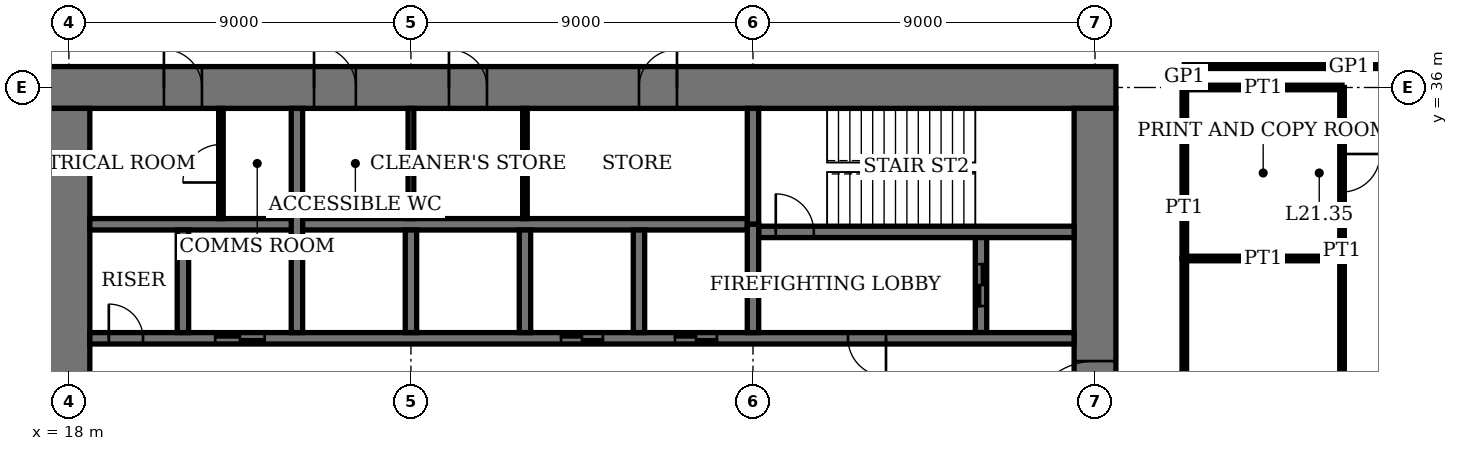
"""IFC4 building model, lengths in metres.
Left out: names, types, materials, properties, quantities, classifications, styles, units other than length and angle.
Written with IfcOpenShell. Run it as: python <this file> out.ifc"""

import sys

from ifc_helpers import new_model, si_unit, direction, frame, frame_2d, origin, place, context, subcontext, project, spatial, rectangle, extrude, element, fill, save


model = new_model("IFC4")
c1 = context("Model", 3, precision=1e-05, world=origin(), true_north=direction((0.0, 1.0)))
c2 = subcontext(c1, "Body", "Model", "MODEL_VIEW")
j1 = project(units=[si_unit("LENGTHUNIT", "METRE"), si_unit("PLANEANGLEUNIT", "RADIAN")], contexts=[c1])
p1 = place(None, origin())
s1 = spatial("IfcSite", under=j1, at=p1, CompositionType="ELEMENT")
p2 = place(p1, origin())
s2 = spatial("IfcBuilding", under=s1, at=p2, CompositionType="ELEMENT")
p3 = place(p2, frame((0.0, 0.0, 89.0)))
s3 = spatial("IfcBuildingStorey", under=s2, at=p3, CompositionType="ELEMENT", Elevation=89.0)
p4 = place(p3, frame((45.55, 36.0, 0.0), z_axis=(0.0, 0.0, 1.0), x_axis=(-1.0, 0.0, 0.0)))
e1 = element("IfcWall", 1, at=p4, inside=s3, PredefinedType="SHEAR", context=c2, shape_type="SweptSolid", body=[
    extrude(rectangle(XDim=28.1, YDim=1.1, at=frame_2d((14.05, 0.0))), origin(), (0.0, 0.0, 1.0), 4.0),
])
p5 = place(p4, frame((11.55, 0.0, 0.0)))
e2 = element("IfcOpeningElement", 2, at=p5, cuts=e1, PredefinedType="OPENING", context=c2, shape_type="SweptSolid", body=[
    extrude(rectangle(XDim=1.0, YDim=2.4, at=frame_2d((0.5, 1.2))), frame((0.0, 0.56, 0.0), z_axis=(0.0, -1.0, 0.0), x_axis=(1.0, 0.0, 0.0)), (0.0, 0.0, 1.0), 1.12),
])
p6 = place(p4, frame((16.55, 0.0, 0.0)))
e3 = element("IfcOpeningElement", 3, at=p6, cuts=e1, PredefinedType="OPENING", context=c2, shape_type="SweptSolid", body=[
    extrude(rectangle(XDim=1.0, YDim=2.4, at=frame_2d((0.5, 1.2))), frame((0.0, 0.56, 0.0), z_axis=(0.0, -1.0, 0.0), x_axis=(1.0, 0.0, 0.0)), (0.0, 0.0, 1.0), 1.12),
])
p7 = place(p4, frame((20.0, 0.0, 0.0)))
e4 = element("IfcOpeningElement", 4, at=p7, cuts=e1, PredefinedType="OPENING", context=c2, shape_type="SweptSolid", body=[
    extrude(rectangle(XDim=1.1, YDim=2.4, at=frame_2d((0.55, 1.2))), frame((0.0, 0.56, 0.0), z_axis=(0.0, -1.0, 0.0), x_axis=(1.0, 0.0, 0.0)), (0.0, 0.0, 1.0), 1.12),
])
p8 = place(p4, frame((24.05, 0.0, 0.0)))
e5 = element("IfcOpeningElement", 5, at=p8, cuts=e1, PredefinedType="OPENING", context=c2, shape_type="SweptSolid", body=[
    extrude(rectangle(XDim=1.0, YDim=2.4, at=frame_2d((0.5, 1.2))), frame((0.0, 0.56, 0.0), z_axis=(0.0, -1.0, 0.0), x_axis=(1.0, 0.0, 0.0)), (0.0, 0.0, 1.0), 1.12),
])
p9 = place(p3, frame((18.0, 35.45, 0.0), z_axis=(0.0, 0.0, 1.0), x_axis=(0.0, -1.0, 0.0)))
e6 = element("IfcWall", 6, at=p9, inside=s3, PredefinedType="SHEAR", context=c2, shape_type="SweptSolid", body=[
    extrude(rectangle(XDim=16.9, YDim=1.1, at=frame_2d((8.45, 0.0))), origin(), (0.0, 0.0, 1.0), 4.0),
])
p10 = place(p9, frame((8.45, 0.0, 0.0)))
e7 = element("IfcOpeningElement", 7, at=p10, cuts=e6, PredefinedType="OPENING", context=c2, shape_type="SweptSolid", body=[
    extrude(rectangle(XDim=1.8, YDim=2.4, at=frame_2d((0.9, 1.2))), frame((0.0, 0.56, 0.0), z_axis=(0.0, -1.0, 0.0), x_axis=(1.0, 0.0, 0.0)), (0.0, 0.0, 1.0), 1.12),
])
p11 = place(p3, frame((45.0, 18.55, 0.0), z_axis=(0.0, 0.0, 1.0), x_axis=(0.0, 1.0, 0.0)))
e8 = element("IfcWall", 8, at=p11, inside=s3, PredefinedType="SHEAR", context=c2, shape_type="SweptSolid", body=[
    extrude(rectangle(XDim=16.9, YDim=1.1, at=frame_2d((8.45, 0.0))), origin(), (0.0, 0.0, 1.0), 4.0),
])
p12 = place(p11, frame((8.45, 0.0, 0.0)))
e9 = element("IfcOpeningElement", 9, at=p12, cuts=e8, PredefinedType="OPENING", context=c2, shape_type="SweptSolid", body=[
    extrude(rectangle(XDim=1.8, YDim=2.4, at=frame_2d((0.9, 1.2))), frame((0.0, 0.56, 0.0), z_axis=(0.0, -1.0, 0.0), x_axis=(1.0, 0.0, 0.0)), (0.0, 0.0, 1.0), 1.12),
])
p13 = place(p3, frame((36.15, 32.2, 0.0), z_axis=(0.0, 0.0, 1.0), x_axis=(1.0, 0.0, 0.0)))
e10 = element("IfcWall", 10, at=p13, inside=s3, PredefinedType="SHEAR", context=c2, shape_type="SweptSolid", body=[
    extrude(rectangle(XDim=8.3, YDim=0.3, at=frame_2d((4.15, 0.0))), origin(), (0.0, 0.0, 1.0), 4.0),
])
p14 = place(p13, frame((0.45, 0.0, 0.0)))
e11 = element("IfcOpeningElement", 11, at=p14, cuts=e10, PredefinedType="OPENING", context=c2, shape_type="SweptSolid", body=[
    extrude(rectangle(XDim=1.0, YDim=2.4, at=frame_2d((0.5, 1.2))), frame((0.0, 0.16, 0.0), z_axis=(0.0, -1.0, 0.0), x_axis=(1.0, 0.0, 0.0)), (0.0, 0.0, 1.0), 0.32),
])
p15 = place(p3, frame((36.0, 32.4, 0.0), z_axis=(0.0, 0.0, 1.0), x_axis=(0.0, 1.0, 0.0)))
e12 = element("IfcWall", 12, at=p15, inside=s3, PredefinedType="SHEAR", context=c2, shape_type="SweptSolid", body=[
    extrude(rectangle(XDim=3.05, YDim=0.3, at=frame_2d((1.525, 0.0))), origin(), (0.0, 0.0, 1.0), 4.0),
])
p16 = place(p3, frame((42.0, 29.55, 0.0), z_axis=(0.0, 0.0, 1.0), x_axis=(0.0, 1.0, 0.0)))
e13 = element("IfcWall", 13, at=p16, inside=s3, PredefinedType="SHEAR", context=c2, shape_type="SweptSolid", body=[
    extrude(rectangle(XDim=2.5, YDim=0.3, at=frame_2d((1.25, 0.0))), origin(), (0.0, 0.0, 1.0), 4.0),
])
p17 = place(p16, frame((0.7, 0.0, 0.0)))
e14 = element("IfcOpeningElement", 14, at=p17, cuts=e13, PredefinedType="OPENING", context=c2, shape_type="SweptSolid", body=[
    extrude(rectangle(XDim=1.1, YDim=2.4, at=frame_2d((0.55, 1.2))), frame((0.0, 0.16, 0.0), z_axis=(0.0, -1.0, 0.0), x_axis=(1.0, 0.0, 0.0)), (0.0, 0.0, 1.0), 0.32),
])
p18 = place(p3, frame((18.55, 29.4, 0.0), z_axis=(0.0, 0.0, 1.0), x_axis=(1.0, 0.0, 0.0)))
e15 = element("IfcWall", 15, at=p18, inside=s3, PredefinedType="SHEAR", context=c2, shape_type="SweptSolid", body=[
    extrude(rectangle(XDim=25.9, YDim=0.3, at=frame_2d((12.95, 0.0))), origin(), (0.0, 0.0, 1.0), 4.0),
])
p19 = place(p18, frame((19.95, 0.0, 0.0)))
e16 = element("IfcOpeningElement", 16, at=p19, cuts=e15, PredefinedType="OPENING", context=c2, shape_type="SweptSolid", body=[
    extrude(rectangle(XDim=1.0, YDim=2.4, at=frame_2d((0.5, 1.2))), frame((0.0, 0.16, 0.0), z_axis=(0.0, -1.0, 0.0), x_axis=(1.0, 0.0, 0.0)), (0.0, 0.0, 1.0), 0.32),
])
p20 = place(p18, frame((0.5, 0.0, 0.0)))
e17 = element("IfcOpeningElement", 17, at=p20, cuts=e15, PredefinedType="OPENING", context=c2, shape_type="SweptSolid", body=[
    extrude(rectangle(XDim=0.9, YDim=2.1, at=frame_2d((0.45, 1.05))), frame((0.0, 0.16, 0.0), z_axis=(0.0, -1.0, 0.0), x_axis=(1.0, 0.0, 0.0)), (0.0, 0.0, 1.0), 0.32),
])
p21 = place(p18, frame((15.4, 0.0, 0.0)))
e18 = element("IfcOpeningElement", 18, at=p21, cuts=e15, PredefinedType="OPENING", context=c2, shape_type="SweptSolid", body=[
    extrude(rectangle(XDim=1.1, YDim=2.4, at=frame_2d((0.55, 1.2))), frame((0.0, 0.16, 0.0), z_axis=(0.0, -1.0, 0.0), x_axis=(1.0, 0.0, 0.0)), (0.0, 0.0, 1.0), 0.32),
])
p22 = place(p18, frame((12.4, 0.0, 0.0)))
e19 = element("IfcOpeningElement", 19, at=p22, cuts=e15, PredefinedType="OPENING", context=c2, shape_type="SweptSolid", body=[
    extrude(rectangle(XDim=1.1, YDim=2.4, at=frame_2d((0.55, 1.2))), frame((0.0, 0.16, 0.0), z_axis=(0.0, -1.0, 0.0), x_axis=(1.0, 0.0, 0.0)), (0.0, 0.0, 1.0), 0.32),
])
p23 = place(p18, frame((3.3, 0.0, 0.0)))
e20 = element("IfcOpeningElement", 20, at=p23, cuts=e15, PredefinedType="OPENING", context=c2, shape_type="SweptSolid", body=[
    extrude(rectangle(XDim=1.3, YDim=2.4, at=frame_2d((0.65, 1.2))), frame((0.0, 0.16, 0.0), z_axis=(0.0, -1.0, 0.0), x_axis=(1.0, 0.0, 0.0)), (0.0, 0.0, 1.0), 0.32),
])
p24 = place(p3, frame((18.55, 32.4, 0.0), z_axis=(0.0, 0.0, 1.0), x_axis=(1.0, 0.0, 0.0)))
e21 = element("IfcWall", 21, at=p24, inside=s3, PredefinedType="SHEAR", context=c2, shape_type="SweptSolid", body=[
    extrude(rectangle(XDim=17.3, YDim=0.3, at=frame_2d((8.65, 0.0))), origin(), (0.0, 0.0, 1.0), 4.0),
])
for number, where, z_axis, x_axis in (
    (22, (33.0, 29.55, 0.0), (0.0, 0.0, 1.0), (0.0, 1.0, 0.0)),
    (23, (30.0, 29.55, 0.0), (0.0, 0.0, 1.0), (0.0, 1.0, 0.0)),
    (24, (27.0, 29.55, 0.0), (0.0, 0.0, 1.0), (0.0, 1.0, 0.0)),
):
    element("IfcWall", number, at=place(p3, frame(where, z_axis=z_axis, x_axis=x_axis)), inside=s3, PredefinedType="SHEAR", context=c2, shape_type="SweptSolid", body=[
        extrude(rectangle(XDim=2.7, YDim=0.3, at=frame_2d((1.35, 0.0))), origin(), (0.0, 0.0, 1.0), 4.0),
    ])
p25 = place(p3, frame((24.0, 29.55, 0.0), z_axis=(0.0, 0.0, 1.0), x_axis=(0.0, 1.0, 0.0)))
e25 = element("IfcWall", 25, at=p25, inside=s3, PredefinedType="SHEAR", context=c2, shape_type="SweptSolid", body=[
    extrude(rectangle(XDim=5.9, YDim=0.3, at=frame_2d((2.95, 0.0))), origin(), (0.0, 0.0, 1.0), 4.0),
])
p26 = place(p3, frame((21.0, 29.55, 0.0), z_axis=(0.0, 0.0, 1.0), x_axis=(0.0, 1.0, 0.0)))
e26 = element("IfcWall", 26, at=p26, inside=s3, PredefinedType="SHEAR", context=c2, shape_type="SweptSolid", body=[
    extrude(rectangle(XDim=2.7, YDim=0.3, at=frame_2d((1.35, 0.0))), origin(), (0.0, 0.0, 1.0), 4.0),
])
p27 = place(p3, frame((36.0, 29.55, 0.0), z_axis=(0.0, 0.0, 1.0), x_axis=(0.0, 1.0, 0.0)))
e27 = element("IfcWall", 27, at=p27, inside=s3, PredefinedType="SHEAR", context=c2, shape_type="SweptSolid", body=[
    extrude(rectangle(XDim=2.85, YDim=0.3, at=frame_2d((1.425, 0.0))), origin(), (0.0, 0.0, 1.0), 4.0),
])
p28 = place(p3, frame((47.35, 31.5, 0.0), z_axis=(0.0, 0.0, 1.0), x_axis=(1.0, 0.0, 0.0)))
e28 = element("IfcWall", 28, at=p28, inside=s3, PredefinedType="PARTITIONING", context=c2, shape_type="SweptSolid", body=[
    extrude(rectangle(XDim=4.15, YDim=0.12, at=frame_2d((2.075, 0.0))), origin(), (0.0, 0.0, 1.0), 3.1),
])
p29 = place(p3, frame((47.35, 36.0, 0.0), z_axis=(0.0, 0.0, 1.0), x_axis=(1.0, 0.0, 0.0)))
e29 = element("IfcWall", 29, at=p29, inside=s3, PredefinedType="PARTITIONING", context=c2, shape_type="SweptSolid", body=[
    extrude(rectangle(XDim=4.15, YDim=0.12, at=frame_2d((2.075, 0.0))), origin(), (0.0, 0.0, 1.0), 3.05),
])
p30 = place(p3, frame((47.35, 36.55, 0.0), z_axis=(0.0, 0.0, 1.0), x_axis=(1.0, 0.0, 0.0)))
e30 = element("IfcWall", 30, at=p30, inside=s3, PredefinedType="PARTITIONING", context=c2, shape_type="SweptSolid", body=[
    extrude(rectangle(XDim=5.575, YDim=0.1, at=frame_2d((2.788, 0.0))), origin(), (0.0, 0.0, 1.0), 3.75),
])
p31 = place(p3, frame((47.35, 31.5, 0.0), z_axis=(0.0, 0.0, 1.0), x_axis=(0.0, 1.0, 0.0)))
e31 = element("IfcWall", 31, at=p31, inside=s3, PredefinedType="PARTITIONING", context=c2, shape_type="SweptSolid", body=[
    extrude(rectangle(XDim=4.5, YDim=0.12, at=frame_2d((2.25, 0.0))), origin(), (0.0, 0.0, 1.0), 3.75),
])
p32 = place(p3, frame((47.35, 22.5, 0.0), z_axis=(0.0, 0.0, 1.0), x_axis=(0.0, 1.0, 0.0)))
e32 = element("IfcWall", 32, at=p32, inside=s3, PredefinedType="PARTITIONING", context=c2, shape_type="SweptSolid", body=[
    extrude(rectangle(XDim=9.0, YDim=0.12, at=frame_2d((4.5, 0.0))), origin(), (0.0, 0.0, 1.0), 3.75),
])
p33 = place(p3, frame((47.35, 36.0, 0.0), z_axis=(0.0, 0.0, 1.0), x_axis=(0.0, 1.0, 0.0)))
e33 = element("IfcWall", 33, at=p33, inside=s3, PredefinedType="PARTITIONING", context=c2, shape_type="SweptSolid", body=[
    extrude(rectangle(XDim=0.55, YDim=0.1, at=frame_2d((0.275, 0.0))), origin(), (0.0, 0.0, 1.0), 3.75),
])
p34 = place(p3, frame((51.5, 31.5, 0.0), z_axis=(0.0, 0.0, 1.0), x_axis=(0.0, 1.0, 0.0)))
e34 = element("IfcWall", 34, at=p34, inside=s3, PredefinedType="PARTITIONING", context=c2, shape_type="SweptSolid", body=[
    extrude(rectangle(XDim=4.5, YDim=0.12, at=frame_2d((2.25, 0.0))), origin(), (0.0, 0.0, 1.0), 3.75),
])
p35 = place(p34, frame((1.75, 0.0, 0.0)))
e35 = element("IfcOpeningElement", 35, at=p35, cuts=e34, PredefinedType="OPENING", context=c2, shape_type="SweptSolid", body=[
    extrude(rectangle(XDim=1.0, YDim=2.4, at=frame_2d((0.5, 1.2))), frame((0.0, 0.07, 0.0), z_axis=(0.0, -1.0, 0.0), x_axis=(1.0, 0.0, 0.0)), (0.0, 0.0, 1.0), 0.14),
])
p36 = place(p3, frame((51.5, 22.5, 0.0), z_axis=(0.0, 0.0, 1.0), x_axis=(0.0, 1.0, 0.0)))
e36 = element("IfcWall", 36, at=p36, inside=s3, PredefinedType="PARTITIONING", context=c2, shape_type="SweptSolid", body=[
    extrude(rectangle(XDim=9.0, YDim=0.12, at=frame_2d((4.5, 0.0))), origin(), (0.0, 0.0, 1.0), 3.75),
])
p37 = place(p36, frame((4.0, 0.0, 0.0)))
e37 = element("IfcOpeningElement", 37, at=p37, cuts=e36, PredefinedType="OPENING", context=c2, shape_type="SweptSolid", body=[
    extrude(rectangle(XDim=1.0, YDim=2.4, at=frame_2d((0.5, 1.2))), frame((0.0, 0.07, 0.0), z_axis=(0.0, -1.0, 0.0), x_axis=(1.0, 0.0, 0.0)), (0.0, 0.0, 1.0), 0.14),
])
p38 = place(p3, frame((30.0, 32.55, 0.0), z_axis=(0.0, 0.0, 1.0), x_axis=(0.0, 1.0, 0.0)))
e38 = element("IfcWall", 38, at=p38, inside=s3, PredefinedType="PARTITIONING", context=c2, shape_type="SweptSolid", body=[
    extrude(rectangle(XDim=2.9, YDim=0.12, at=frame_2d((1.45, 0.0))), origin(), (0.0, 0.0, 1.0), 3.75),
])
p39 = place(p3, frame((27.0, 32.55, 0.0), z_axis=(0.0, 0.0, 1.0), x_axis=(0.0, 1.0, 0.0)))
e39 = element("IfcWall", 39, at=p39, inside=s3, PredefinedType="PARTITIONING", context=c2, shape_type="SweptSolid", body=[
    extrude(rectangle(XDim=2.9, YDim=0.15, at=frame_2d((1.45, 0.0))), origin(), (0.0, 0.0, 1.0), 3.75),
])
p40 = place(p3, frame((22.0, 32.55, 0.0), z_axis=(0.0, 0.0, 1.0), x_axis=(0.0, 1.0, 0.0)))
e40 = element("IfcWall", 40, at=p40, inside=s3, PredefinedType="PARTITIONING", context=c2, shape_type="SweptSolid", body=[
    extrude(rectangle(XDim=2.9, YDim=0.12, at=frame_2d((1.45, 0.0))), origin(), (0.0, 0.0, 1.0), 3.75),
])
p41 = place(p40, frame((0.95, 0.0, 0.0)))
e41 = element("IfcOpeningElement", 41, at=p41, cuts=e40, PredefinedType="OPENING", context=c2, shape_type="SweptSolid", body=[
    extrude(rectangle(XDim=1.0, YDim=2.4, at=frame_2d((0.5, 1.2))), frame((0.0, 0.07, 0.0), z_axis=(0.0, -1.0, 0.0), x_axis=(1.0, 0.0, 0.0)), (0.0, 0.0, 1.0), 0.14),
])
p42 = place(p12, origin())
e42 = element("IfcDoor", 42, at=p42, inside=s3, OperationType="DOUBLE_DOOR_DOUBLE_SWING", PredefinedType="DOOR", context=c2, shape_type="SweptSolid", body=[
    extrude(rectangle(XDim=1.8, YDim=2.4, at=frame_2d((0.9, 1.2))), frame((0.0, 0.03, 0.0), z_axis=(0.0, -1.0, 0.0), x_axis=(1.0, 0.0, 0.0)), (0.0, 0.0, 1.0), 0.06),
    extrude(rectangle(XDim=0.04, YDim=2.4, at=frame_2d((0.02, 1.2))), frame((0.0, 0.55, 0.0), z_axis=(0.0, -1.0, 0.0), x_axis=(1.0, 0.0, 0.0)), (0.0, 0.0, 1.0), 1.1),
    extrude(rectangle(XDim=0.04, YDim=2.4, at=frame_2d((1.78, 1.2))), frame((0.0, 0.55, 0.0), z_axis=(0.0, -1.0, 0.0), x_axis=(1.0, 0.0, 0.0)), (0.0, 0.0, 1.0), 1.1),
    extrude(rectangle(XDim=1.8, YDim=0.04, at=frame_2d((0.9, 2.38))), frame((0.0, 0.55, 0.0), z_axis=(0.0, -1.0, 0.0), x_axis=(1.0, 0.0, 0.0)), (0.0, 0.0, 1.0), 1.1),
])
fill(e9, e42)
p43 = place(p5, origin())
e43 = element("IfcDoor", 43, at=p43, inside=s3, OperationType="SINGLE_SWING_LEFT", PredefinedType="DOOR", context=c2, shape_type="SweptSolid", body=[
    extrude(rectangle(XDim=1.0, YDim=2.4, at=frame_2d((0.5, 1.2))), frame((0.0, 0.025, 0.0), z_axis=(0.0, -1.0, 0.0), x_axis=(1.0, 0.0, 0.0)), (0.0, 0.0, 1.0), 0.05),
    extrude(rectangle(XDim=0.04, YDim=2.4, at=frame_2d((0.02, 1.2))), frame((0.0, 0.4, 0.0), z_axis=(0.0, -1.0, 0.0), x_axis=(1.0, 0.0, 0.0)), (0.0, 0.0, 1.0), 0.8),
    extrude(rectangle(XDim=0.04, YDim=2.4, at=frame_2d((0.98, 1.2))), frame((0.0, 0.4, 0.0), z_axis=(0.0, -1.0, 0.0), x_axis=(1.0, 0.0, 0.0)), (0.0, 0.0, 1.0), 0.8),
    extrude(rectangle(XDim=1.0, YDim=0.04, at=frame_2d((0.5, 2.38))), frame((0.0, 0.4, 0.0), z_axis=(0.0, -1.0, 0.0), x_axis=(1.0, 0.0, 0.0)), (0.0, 0.0, 1.0), 0.8),
])
fill(e2, e43)
p44 = place(p6, origin())
e44 = element("IfcDoor", 44, at=p44, inside=s3, OperationType="SINGLE_SWING_RIGHT", PredefinedType="DOOR", context=c2, shape_type="SweptSolid", body=[
    extrude(rectangle(XDim=1.0, YDim=2.4, at=frame_2d((0.5, 1.2))), frame((0.0, 0.025, 0.0), z_axis=(0.0, -1.0, 0.0), x_axis=(1.0, 0.0, 0.0)), (0.0, 0.0, 1.0), 0.05),
    extrude(rectangle(XDim=0.04, YDim=2.4, at=frame_2d((0.02, 1.2))), frame((0.0, 0.4, 0.0), z_axis=(0.0, -1.0, 0.0), x_axis=(1.0, 0.0, 0.0)), (0.0, 0.0, 1.0), 0.8),
    extrude(rectangle(XDim=0.04, YDim=2.4, at=frame_2d((0.98, 1.2))), frame((0.0, 0.4, 0.0), z_axis=(0.0, -1.0, 0.0), x_axis=(1.0, 0.0, 0.0)), (0.0, 0.0, 1.0), 0.8),
    extrude(rectangle(XDim=1.0, YDim=0.04, at=frame_2d((0.5, 2.38))), frame((0.0, 0.4, 0.0), z_axis=(0.0, -1.0, 0.0), x_axis=(1.0, 0.0, 0.0)), (0.0, 0.0, 1.0), 0.8),
])
fill(e3, e44)
p45 = place(p7, origin())
e45 = element("IfcDoor", 45, at=p45, inside=s3, OperationType="SINGLE_SWING_RIGHT", PredefinedType="DOOR", context=c2, shape_type="SweptSolid", body=[
    extrude(rectangle(XDim=1.1, YDim=2.4, at=frame_2d((0.55, 1.2))), frame((0.0, 0.025, 0.0), z_axis=(0.0, -1.0, 0.0), x_axis=(1.0, 0.0, 0.0)), (0.0, 0.0, 1.0), 0.05),
    extrude(rectangle(XDim=0.04, YDim=2.4, at=frame_2d((0.02, 1.2))), frame((0.0, 0.44, 0.0), z_axis=(0.0, -1.0, 0.0), x_axis=(1.0, 0.0, 0.0)), (0.0, 0.0, 1.0), 0.88),
    extrude(rectangle(XDim=0.04, YDim=2.4, at=frame_2d((1.08, 1.2))), frame((0.0, 0.44, 0.0), z_axis=(0.0, -1.0, 0.0), x_axis=(1.0, 0.0, 0.0)), (0.0, 0.0, 1.0), 0.88),
    extrude(rectangle(XDim=1.1, YDim=0.04, at=frame_2d((0.55, 2.38))), frame((0.0, 0.44, 0.0), z_axis=(0.0, -1.0, 0.0), x_axis=(1.0, 0.0, 0.0)), (0.0, 0.0, 1.0), 0.88),
])
fill(e4, e45)
p46 = place(p8, origin())
e46 = element("IfcDoor", 46, at=p46, inside=s3, OperationType="SINGLE_SWING_RIGHT", PredefinedType="DOOR", context=c2, shape_type="SweptSolid", body=[
    extrude(rectangle(XDim=1.0, YDim=2.4, at=frame_2d((0.5, 1.2))), frame((0.0, 0.025, 0.0), z_axis=(0.0, -1.0, 0.0), x_axis=(1.0, 0.0, 0.0)), (0.0, 0.0, 1.0), 0.05),
    extrude(rectangle(XDim=0.04, YDim=2.4, at=frame_2d((0.02, 1.2))), frame((0.0, 0.4, 0.0), z_axis=(0.0, -1.0, 0.0), x_axis=(1.0, 0.0, 0.0)), (0.0, 0.0, 1.0), 0.8),
    extrude(rectangle(XDim=0.04, YDim=2.4, at=frame_2d((0.98, 1.2))), frame((0.0, 0.4, 0.0), z_axis=(0.0, -1.0, 0.0), x_axis=(1.0, 0.0, 0.0)), (0.0, 0.0, 1.0), 0.8),
    extrude(rectangle(XDim=1.0, YDim=0.04, at=frame_2d((0.5, 2.38))), frame((0.0, 0.4, 0.0), z_axis=(0.0, -1.0, 0.0), x_axis=(1.0, 0.0, 0.0)), (0.0, 0.0, 1.0), 0.8),
])
fill(e5, e46)
p47 = place(p14, origin())
e47 = element("IfcDoor", 47, at=p47, inside=s3, OperationType="SINGLE_SWING_RIGHT", PredefinedType="DOOR", context=c2, shape_type="SweptSolid", body=[
    extrude(rectangle(XDim=1.0, YDim=2.4, at=frame_2d((0.5, 1.2))), frame((0.0, 0.03, 0.0), z_axis=(0.0, -1.0, 0.0), x_axis=(1.0, 0.0, 0.0)), (0.0, 0.0, 1.0), 0.06),
])
fill(e11, e47)
p48 = place(p19, origin())
e48 = element("IfcDoor", 48, at=p48, inside=s3, OperationType="SINGLE_SWING_RIGHT", PredefinedType="DOOR", context=c2, shape_type="SweptSolid", body=[
    extrude(rectangle(XDim=1.0, YDim=2.4, at=frame_2d((0.5, 1.2))), frame((0.0, 0.03, 0.0), z_axis=(0.0, -1.0, 0.0), x_axis=(1.0, 0.0, 0.0)), (0.0, 0.0, 1.0), 0.06),
])
fill(e16, e48)
p49 = place(p20, origin())
e49 = element("IfcDoor", 49, at=p49, inside=s3, OperationType="SINGLE_SWING_RIGHT", PredefinedType="DOOR", context=c2, shape_type="SweptSolid", body=[
    extrude(rectangle(XDim=0.9, YDim=2.1, at=frame_2d((0.45, 1.05))), frame((0.0, 0.03, 0.0), z_axis=(0.0, -1.0, 0.0), x_axis=(1.0, 0.0, 0.0)), (0.0, 0.0, 1.0), 0.06),
])
fill(e17, e49)
p50 = place(p35, origin())
e50 = element("IfcDoor", 50, at=p50, inside=s3, OperationType="SINGLE_SWING_RIGHT", PredefinedType="DOOR", context=c2, shape_type="SweptSolid", body=[
    extrude(rectangle(XDim=1.0, YDim=2.4, at=frame_2d((0.5, 1.2))), frame((0.0, 0.025, 0.0), z_axis=(0.0, -1.0, 0.0), x_axis=(1.0, 0.0, 0.0)), (0.0, 0.0, 1.0), 0.05),
])
fill(e35, e50)
p51 = place(p41, origin())
e51 = element("IfcDoor", 51, at=p51, inside=s3, OperationType="SINGLE_SWING_RIGHT", PredefinedType="DOOR", context=c2, shape_type="SweptSolid", body=[
    extrude(rectangle(XDim=1.0, YDim=2.4, at=frame_2d((0.5, 1.2))), frame((0.0, 0.03, 0.0), z_axis=(0.0, -1.0, 0.0), x_axis=(1.0, 0.0, 0.0)), (0.0, 0.0, 1.0), 0.06),
])
fill(e41, e51)
p52 = place(p21, origin())
e52 = element("IfcDoor", 52, at=p52, inside=s3, OperationType="DOUBLE_DOOR_SLIDING", PredefinedType="DOOR", context=c2, shape_type="SweptSolid", body=[
    extrude(rectangle(XDim=1.1, YDim=2.4, at=frame_2d((0.55, 1.2))), frame((0.0, 0.02, 0.0), z_axis=(0.0, -1.0, 0.0), x_axis=(1.0, 0.0, 0.0)), (0.0, 0.0, 1.0), 0.04),
])
fill(e18, e52)
p53 = place(p22, origin())
e53 = element("IfcDoor", 53, at=p53, inside=s3, OperationType="DOUBLE_DOOR_SLIDING", PredefinedType="DOOR", context=c2, shape_type="SweptSolid", body=[
    extrude(rectangle(XDim=1.1, YDim=2.4, at=frame_2d((0.55, 1.2))), frame((0.0, 0.02, 0.0), z_axis=(0.0, -1.0, 0.0), x_axis=(1.0, 0.0, 0.0)), (0.0, 0.0, 1.0), 0.04),
])
fill(e19, e53)
p54 = place(p23, origin())
e54 = element("IfcDoor", 54, at=p54, inside=s3, OperationType="DOUBLE_DOOR_SLIDING", PredefinedType="DOOR", context=c2, shape_type="SweptSolid", body=[
    extrude(rectangle(XDim=1.3, YDim=2.4, at=frame_2d((0.65, 1.2))), frame((0.0, 0.02, 0.0), z_axis=(0.0, -1.0, 0.0), x_axis=(1.0, 0.0, 0.0)), (0.0, 0.0, 1.0), 0.04),
])
fill(e20, e54)
p55 = place(p17, origin())
e55 = element("IfcDoor", 55, at=p55, inside=s3, OperationType="DOUBLE_DOOR_SLIDING", PredefinedType="DOOR", context=c2, shape_type="SweptSolid", body=[
    extrude(rectangle(XDim=1.1, YDim=2.4, at=frame_2d((0.55, 1.2))), frame((0.0, 0.03, 0.0), z_axis=(0.0, -1.0, 0.0), x_axis=(1.0, 0.0, 0.0)), (0.0, 0.0, 1.0), 0.06),
])
fill(e14, e55)
save(model, sys.argv[1])
